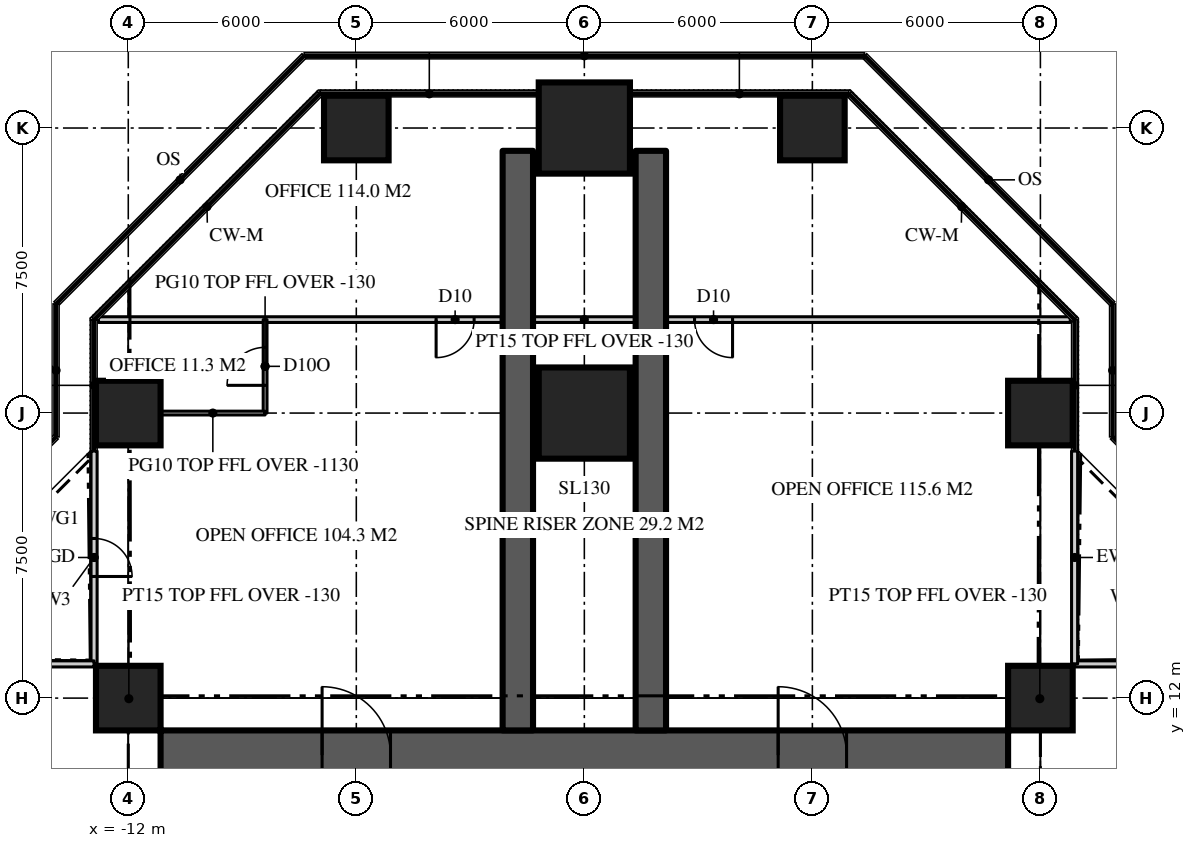
"""IFC4 building model, lengths in metres.
Left out: names, types, materials, properties, quantities, classifications, styles, units other than length and angle.
Written with IfcOpenShell. Run it as: python <this file> out.ifc"""

import sys

from ifc_helpers import new_model, si_unit, direction, frame, frame_2d, origin, origin_2d, place, context, subcontext, project, spatial, rectangle, extrude, element, fill, save


model = new_model("IFC4")
c1 = context("Model", 3, precision=1e-05, world=origin(), true_north=direction((0.0, 1.0)))
c2 = subcontext(c1, "Body", "Model", "MODEL_VIEW")
j1 = project(units=[si_unit("LENGTHUNIT", "METRE"), si_unit("PLANEANGLEUNIT", "RADIAN")], contexts=[c1])
p1 = place(None, origin())
s1 = spatial("IfcSite", under=j1, at=p1, CompositionType="ELEMENT")
p2 = place(p1, origin())
s2 = spatial("IfcBuilding", under=s1, at=p2, CompositionType="ELEMENT")
p3 = place(p2, frame((0.0, 0.0, 190.5)))
s3 = spatial("IfcBuildingStorey", under=s2, at=p3, CompositionType="ELEMENT", Elevation=190.5)
p4 = place(p3, frame((-11.15, 10.5, 0.0), z_axis=(0.0, 0.0, 1.0), x_axis=(1.0, 0.0, 0.0)))
e1 = element("IfcWall", 1, at=p4, inside=s3, PredefinedType="SHEAR", context=c2, shape_type="SweptSolid", body=[
    extrude(rectangle(XDim=22.3, YDim=1.3, at=frame_2d((11.15, 0.0))), origin(), (0.0, 0.0, 1.0), 3.9),
])
p5 = place(p4, frame((4.25, 0.0, 0.0)))
e2 = element("IfcOpeningElement", 2, at=p5, cuts=e1, PredefinedType="OPENING", context=c2, shape_type="SweptSolid", body=[
    extrude(rectangle(XDim=1.8, YDim=2.2, at=frame_2d((0.9, 1.1))), frame((0.0, 0.66, 0.0), z_axis=(0.0, -1.0, 0.0), x_axis=(1.0, 0.0, 0.0)), (0.0, 0.0, 1.0), 1.32),
])
p6 = place(p4, frame((16.25, 0.0, 0.0)))
e3 = element("IfcOpeningElement", 3, at=p6, cuts=e1, PredefinedType="OPENING", context=c2, shape_type="SweptSolid", body=[
    extrude(rectangle(XDim=1.8, YDim=2.2, at=frame_2d((0.9, 1.1))), frame((0.0, 0.66, 0.0), z_axis=(0.0, -1.0, 0.0), x_axis=(1.0, 0.0, 0.0)), (0.0, 0.0, 1.0), 1.32),
])
for number, where, z_axis, x_axis in (
    (4, (1.75, 11.15, 0.0), (0.0, 0.0, 1.0), (0.0, 1.0, 0.0)),
    (5, (-1.75, 11.15, 0.0), (0.0, 0.0, 1.0), (0.0, 1.0, 0.0)),
):
    element("IfcWall", number, at=place(p3, frame(where, z_axis=z_axis, x_axis=x_axis)), inside=s3, PredefinedType="SHEAR", context=c2, shape_type="SweptSolid", body=[
        extrude(rectangle(XDim=15.25, YDim=0.8, at=frame_2d((7.625, 0.0))), origin(), (0.0, 0.0, 1.0), 3.9),
    ])
for number, where, z_axis, x_axis in (
    (6, (-12.0, 12.0, 0.0), (0.0, 0.0, 1.0), (1.0, 0.0, 0.0)),
    (7, (12.0, 12.0, 0.0), (0.0, 0.0, 1.0), (1.0, 0.0, 0.0)),
    (8, (-12.0, 19.5, 0.0), (0.0, 0.0, 1.0), (1.0, 0.0, 0.0)),
):
    element("IfcColumn", number, at=place(p3, frame(where, z_axis=z_axis, x_axis=x_axis)), inside=s3, PredefinedType="COLUMN", context=c2, shape_type="SweptSolid", body=[
        extrude(rectangle(XDim=1.7, YDim=1.7, at=origin_2d()), origin(), (0.0, 0.0, 1.0), 3.9),
    ])
p7 = place(p3, frame((0.0, 19.5, 0.0), z_axis=(0.0, 0.0, 1.0), x_axis=(1.0, 0.0, 0.0)))
e9 = element("IfcColumn", 9, at=p7, inside=s3, PredefinedType="COLUMN", context=c2, shape_type="SweptSolid", body=[
    extrude(rectangle(XDim=2.4, YDim=2.4, at=origin_2d()), origin(), (0.0, 0.0, 1.0), 3.9),
])
for number, where, z_axis, x_axis in (
    (10, (12.0, 19.5, 0.0), (0.0, 0.0, 1.0), (1.0, 0.0, 0.0)),
    (11, (-6.0, 27.0, 0.0), (0.0, 0.0, 1.0), (1.0, 0.0, 0.0)),
):
    element("IfcColumn", number, at=place(p3, frame(where, z_axis=z_axis, x_axis=x_axis)), inside=s3, PredefinedType="COLUMN", context=c2, shape_type="SweptSolid", body=[
        extrude(rectangle(XDim=1.7, YDim=1.7, at=origin_2d()), origin(), (0.0, 0.0, 1.0), 3.9),
    ])
p8 = place(p3, frame((0.0, 27.0, 0.0), z_axis=(0.0, 0.0, 1.0), x_axis=(1.0, 0.0, 0.0)))
e12 = element("IfcColumn", 12, at=p8, inside=s3, PredefinedType="COLUMN", context=c2, shape_type="SweptSolid", body=[
    extrude(rectangle(XDim=2.4, YDim=2.4, at=origin_2d()), origin(), (0.0, 0.0, 1.0), 3.9),
])
p9 = place(p3, frame((6.0, 27.0, 0.0), z_axis=(0.0, 0.0, 1.0), x_axis=(1.0, 0.0, 0.0)))
e13 = element("IfcColumn", 13, at=p9, inside=s3, PredefinedType="COLUMN", context=c2, shape_type="SweptSolid", body=[
    extrude(rectangle(XDim=1.7, YDim=1.7, at=origin_2d()), origin(), (0.0, 0.0, 1.0), 3.9),
])
p10 = place(p3, frame((18.5, 12.9, 0.0), z_axis=(0.0, 0.0, 1.0), x_axis=(-1.0, 0.0, 0.0)))
e14 = element("IfcWall", 14, at=p10, inside=s3, PredefinedType="SOLIDWALL", context=c2, shape_type="SweptSolid", body=[
    extrude(rectangle(XDim=5.6, YDim=0.16, at=frame_2d((2.8, 0.0))), origin(), (0.0, 0.0, 1.0), 3.77),
])
p11 = place(p10, frame((2.3, 0.0, 0.0)))
e15 = element("IfcOpeningElement", 15, at=p11, cuts=e14, PredefinedType="OPENING", context=c2, shape_type="SweptSolid", body=[
    extrude(rectangle(XDim=1.0, YDim=2.2, at=frame_2d((0.5, 1.1))), frame((0.0, 0.09, 0.0), z_axis=(0.0, -1.0, 0.0), x_axis=(1.0, 0.0, 0.0)), (0.0, 0.0, 1.0), 0.18),
])
p12 = place(p3, frame((12.9, 12.9, 0.0), z_axis=(0.0, 0.0, 1.0), x_axis=(0.0, 1.0, 0.0)))
e16 = element("IfcWall", 16, at=p12, inside=s3, PredefinedType="SOLIDWALL", context=c2, shape_type="SweptSolid", body=[
    extrude(rectangle(XDim=5.6, YDim=0.16, at=frame_2d((2.8, 0.0))), origin(), (0.0, 0.0, 1.0), 3.77),
])
p13 = place(p3, frame((-12.9, 18.5, 0.0), z_axis=(0.0, 0.0, 1.0), x_axis=(0.0, -1.0, 0.0)))
e17 = element("IfcWall", 17, at=p13, inside=s3, PredefinedType="SOLIDWALL", context=c2, shape_type="SweptSolid", body=[
    extrude(rectangle(XDim=5.6, YDim=0.16, at=frame_2d((2.8, 0.0))), origin(), (0.0, 0.0, 1.0), 3.77),
])
p14 = place(p13, frame((2.3, 0.0, 0.0)))
e18 = element("IfcOpeningElement", 18, at=p14, cuts=e17, PredefinedType="OPENING", context=c2, shape_type="SweptSolid", body=[
    extrude(rectangle(XDim=1.0, YDim=2.2, at=frame_2d((0.5, 1.1))), frame((0.0, 0.09, 0.0), z_axis=(0.0, -1.0, 0.0), x_axis=(1.0, 0.0, 0.0)), (0.0, 0.0, 1.0), 0.18),
])
p15 = place(p3, frame((-12.9, 12.9, 0.0), z_axis=(0.0, 0.0, 1.0), x_axis=(-1.0, 0.0, 0.0)))
e19 = element("IfcWall", 19, at=p15, inside=s3, PredefinedType="SOLIDWALL", context=c2, shape_type="SweptSolid", body=[
    extrude(rectangle(XDim=5.6, YDim=0.16, at=frame_2d((2.8, 0.0))), origin(), (0.0, 0.0, 1.0), 3.77),
])
p16 = place(p3, frame((12.786, 21.959, 0.0), z_axis=(0.0, 0.0, 1.0), x_axis=(-1.0, 0.0, 0.0)))
e20 = element("IfcWall", 20, at=p16, inside=s3, PredefinedType="PARTITIONING", context=c2, shape_type="SweptSolid", body=[
    extrude(rectangle(XDim=25.573, YDim=0.15, at=frame_2d((12.786, 0.0))), origin(), (0.0, 0.0, 1.0), 3.77),
])
p17 = place(p16, frame((15.687, 0.0, 0.0)))
e21 = element("IfcOpeningElement", 21, at=p17, cuts=e20, PredefinedType="OPENING", context=c2, shape_type="SweptSolid", body=[
    extrude(rectangle(XDim=1.0, YDim=2.2, at=frame_2d((0.5, 1.1))), frame((0.0, 0.085, 0.0), z_axis=(0.0, -1.0, 0.0), x_axis=(1.0, 0.0, 0.0)), (0.0, 0.0, 1.0), 0.17),
])
p18 = place(p16, frame((8.886, 0.0, 0.0)))
e22 = element("IfcOpeningElement", 22, at=p18, cuts=e20, PredefinedType="OPENING", context=c2, shape_type="SweptSolid", body=[
    extrude(rectangle(XDim=1.0, YDim=2.2, at=frame_2d((0.5, 1.1))), frame((0.0, 0.085, 0.0), z_axis=(0.0, -1.0, 0.0), x_axis=(1.0, 0.0, 0.0)), (0.0, 0.0, 1.0), 0.17),
])
p19 = place(p3, frame((-8.4, 19.5, 0.0), z_axis=(0.0, 0.0, 1.0), x_axis=(0.0, 1.0, 0.0)))
e23 = element("IfcWall", 23, at=p19, inside=s3, PredefinedType="PARTITIONING", context=c2, shape_type="SweptSolid", body=[
    extrude(rectangle(XDim=2.459, YDim=0.1, at=frame_2d((1.229, 0.0))), origin(), (0.0, 0.0, 1.0), 3.77),
])
p20 = place(p19, frame((0.729, 0.0, 0.0)))
e24 = element("IfcOpeningElement", 24, at=p20, cuts=e23, PredefinedType="OPENING", context=c2, shape_type="SweptSolid", body=[
    extrude(rectangle(XDim=1.0, YDim=2.2, at=frame_2d((0.5, 1.1))), frame((0.0, 0.06, 0.0), z_axis=(0.0, -1.0, 0.0), x_axis=(1.0, 0.0, 0.0)), (0.0, 0.0, 1.0), 0.12),
])
p21 = place(p3, frame((-8.4, 19.5, 0.0), z_axis=(0.0, 0.0, 1.0), x_axis=(-1.0, 0.0, 0.0)))
e25 = element("IfcWall", 25, at=p21, inside=s3, PredefinedType="PARTITIONING", context=c2, shape_type="SweptSolid", body=[
    extrude(rectangle(XDim=2.75, YDim=0.1, at=frame_2d((1.375, 0.0))), origin(), (0.0, 0.0, 1.0), 2.77),
])
for number, where, z_axis, x_axis in (
    (26, (11.15, 11.15, 0.0), (0.0, 0.0, 1.0), (0.707, 0.707, 0.0)),
    (27, (-11.15, 11.15, 0.0), (0.0, 0.0, 1.0), (-0.707, 0.707, 0.0)),
):
    element("IfcWall", number, at=place(p3, frame(where, z_axis=z_axis, x_axis=x_axis)), inside=s3, PredefinedType="PARTITIONING", context=c2, shape_type="SweptSolid", body=[
        extrude(rectangle(XDim=2.362, YDim=0.15, at=frame_2d((1.181, 0.0))), origin(), (0.0, 0.0, 1.0), 3.77),
    ])
p22 = place(p14, origin())
e28 = element("IfcDoor", 28, at=p22, inside=s3, OperationType="SINGLE_SWING_RIGHT", PredefinedType="DOOR", context=c2, shape_type="SweptSolid", body=[
    extrude(rectangle(XDim=1.0, YDim=2.2, at=frame_2d((0.5, 1.1))), frame((0.0, 0.025, 0.0), z_axis=(0.0, -1.0, 0.0), x_axis=(1.0, 0.0, 0.0)), (0.0, 0.0, 1.0), 0.05),
])
fill(e18, e28)
p23 = place(p5, origin())
e29 = element("IfcDoor", 29, at=p23, inside=s3, OperationType="DOUBLE_DOOR_DOUBLE_SWING", PredefinedType="DOOR", context=c2, shape_type="SweptSolid", body=[
    extrude(rectangle(XDim=1.8, YDim=2.2, at=frame_2d((0.9, 1.1))), frame((0.0, 0.025, 0.0), z_axis=(0.0, -1.0, 0.0), x_axis=(1.0, 0.0, 0.0)), (0.0, 0.0, 1.0), 0.05),
])
fill(e2, e29)
p24 = place(p6, origin())
e30 = element("IfcDoor", 30, at=p24, inside=s3, OperationType="DOUBLE_DOOR_DOUBLE_SWING", PredefinedType="DOOR", context=c2, shape_type="SweptSolid", body=[
    extrude(rectangle(XDim=1.8, YDim=2.2, at=frame_2d((0.9, 1.1))), frame((0.0, 0.025, 0.0), z_axis=(0.0, -1.0, 0.0), x_axis=(1.0, 0.0, 0.0)), (0.0, 0.0, 1.0), 0.05),
])
fill(e3, e30)
p25 = place(p17, origin())
e31 = element("IfcDoor", 31, at=p25, inside=s3, OperationType="SINGLE_SWING_RIGHT", PredefinedType="DOOR", context=c2, shape_type="SweptSolid", body=[
    extrude(rectangle(XDim=1.0, YDim=2.2, at=frame_2d((0.5, 1.1))), frame((0.0, 0.025, 0.0), z_axis=(0.0, -1.0, 0.0), x_axis=(1.0, 0.0, 0.0)), (0.0, 0.0, 1.0), 0.05),
])
fill(e21, e31)
p26 = place(p18, origin())
e32 = element("IfcDoor", 32, at=p26, inside=s3, OperationType="SINGLE_SWING_LEFT", PredefinedType="DOOR", context=c2, shape_type="SweptSolid", body=[
    extrude(rectangle(XDim=1.0, YDim=2.2, at=frame_2d((0.5, 1.1))), frame((0.0, 0.025, 0.0), z_axis=(0.0, -1.0, 0.0), x_axis=(1.0, 0.0, 0.0)), (0.0, 0.0, 1.0), 0.05),
])
fill(e22, e32)
p27 = place(p20, origin())
e33 = element("IfcDoor", 33, at=p27, inside=s3, OperationType="SINGLE_SWING_LEFT", PredefinedType="DOOR", context=c2, shape_type="SweptSolid", body=[
    extrude(rectangle(XDim=1.0, YDim=2.2, at=frame_2d((0.5, 1.1))), frame((0.0, 0.025, 0.0), z_axis=(0.0, -1.0, 0.0), x_axis=(1.0, 0.0, 0.0)), (0.0, 0.0, 1.0), 0.05),
])
fill(e24, e33)
save(model, sys.argv[1])
